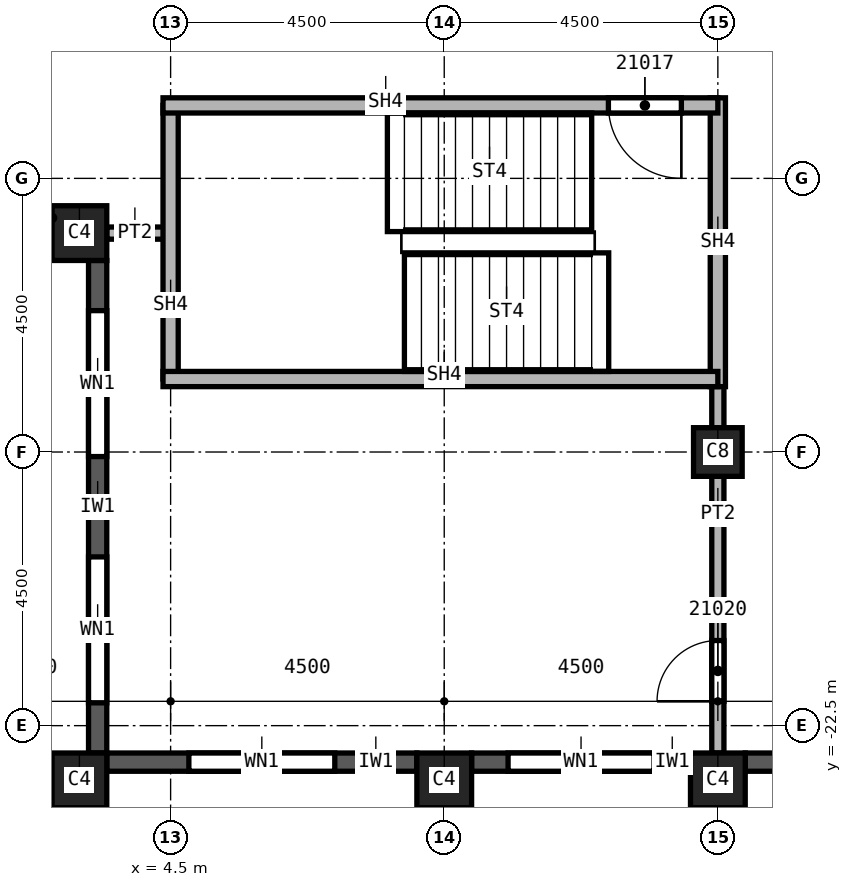
"""IFC4 building model, lengths in metres.
Left out: names, types, materials, properties, quantities, classifications, styles, units other than length and angle.
Written with IfcOpenShell. Run it as: python <this file> out.ifc"""

import sys

from ifc_helpers import new_model, si_unit, direction, frame, frame_2d, origin, origin_2d, place, context, subcontext, project, spatial, rectangle, extrude, element, fill, save


model = new_model("IFC4")
c1 = context("Model", 3, precision=1e-05, world=origin(), true_north=direction((0.0, 1.0)))
c2 = subcontext(c1, "Body", "Model", "MODEL_VIEW")
j1 = project(units=[si_unit("LENGTHUNIT", "METRE"), si_unit("PLANEANGLEUNIT", "RADIAN")], contexts=[c1])
p1 = place(None, origin())
s1 = spatial("IfcSite", under=j1, at=p1, CompositionType="ELEMENT")
p2 = place(p1, origin())
s2 = spatial("IfcBuilding", under=s1, at=p2, CompositionType="ELEMENT")
p3 = place(p2, frame((0.0, 0.0, 308.0)))
s3 = spatial("IfcBuildingStorey", under=s2, at=p3, CompositionType="ELEMENT", Elevation=308.0)
p4 = place(p3, frame((13.5, -18.0, 0.0), z_axis=(0.0, 0.0, 1.0), x_axis=(1.0, 0.0, 0.0)))
e1 = element("IfcColumn", 1, at=p4, inside=s3, PredefinedType="COLUMN", context=c2, shape_type="SweptSolid", body=[
    extrude(rectangle(XDim=0.8, YDim=0.8, at=origin_2d()), origin(), (0.0, 0.0, 1.0), 3.74),
])
for number, where, z_axis, x_axis in (
    (2, (3.0, -23.4, 0.0), (0.0, 0.0, 1.0), (1.0, 0.0, 0.0)),
    (3, (9.0, -23.4, 0.0), (0.0, 0.0, 1.0), (1.0, 0.0, 0.0)),
    (4, (13.5, -23.4, 0.0), (0.0, 0.0, 1.0), (1.0, 0.0, 0.0)),
    (5, (3.0, -14.4, 0.0), (0.0, 0.0, 1.0), (1.0, 0.0, 0.0)),
):
    element("IfcColumn", number, at=place(p3, frame(where, z_axis=z_axis, x_axis=x_axis)), inside=s3, PredefinedType="COLUMN", context=c2, shape_type="SweptSolid", body=[
        extrude(rectangle(XDim=0.9, YDim=0.9, at=origin_2d()), origin(), (0.0, 0.0, 1.0), 3.74),
    ])
p5 = place(p3, frame((3.3, -14.85, 0.0), z_axis=(0.0, 0.0, 1.0), x_axis=(0.0, -1.0, 0.0)))
e6 = element("IfcWall", 6, at=p5, inside=s3, PredefinedType="SOLIDWALL", context=c2, shape_type="SweptSolid", body=[
    extrude(rectangle(XDim=8.1, YDim=0.3, at=frame_2d((4.05, 0.0))), origin(), (0.0, 0.0, 1.0), 3.14),
])
p6 = place(p5, frame((0.825, 0.0, 0.8)))
e7 = element("IfcOpeningElement", 7, at=p6, cuts=e6, PredefinedType="OPENING", context=c2, shape_type="SweptSolid", body=[
    extrude(rectangle(XDim=2.4, YDim=1.95, at=frame_2d((1.2, 0.975))), frame((0.0, 0.15, 0.0), z_axis=(0.0, -1.0, 0.0), x_axis=(1.0, 0.0, 0.0)), (0.0, 0.0, 1.0), 0.3),
])
p7 = place(p5, frame((4.875, 0.0, 0.8)))
e8 = element("IfcOpeningElement", 8, at=p7, cuts=e6, PredefinedType="OPENING", context=c2, shape_type="SweptSolid", body=[
    extrude(rectangle(XDim=2.4, YDim=1.95, at=frame_2d((1.2, 0.975))), frame((0.0, 0.15, 0.0), z_axis=(0.0, -1.0, 0.0), x_axis=(1.0, 0.0, 0.0)), (0.0, 0.0, 1.0), 0.3),
])
p8 = place(p3, frame((3.45, -23.1, 0.0), z_axis=(0.0, 0.0, 1.0), x_axis=(1.0, 0.0, 0.0)))
e9 = element("IfcWall", 9, at=p8, inside=s3, PredefinedType="SOLIDWALL", context=c2, shape_type="SweptSolid", body=[
    extrude(rectangle(XDim=5.1, YDim=0.3, at=frame_2d((2.55, 0.0))), origin(), (0.0, 0.0, 1.0), 3.14),
])
p9 = place(p8, frame((1.35, 0.0, 0.8)))
e10 = element("IfcOpeningElement", 10, at=p9, cuts=e9, PredefinedType="OPENING", context=c2, shape_type="SweptSolid", body=[
    extrude(rectangle(XDim=2.4, YDim=1.95, at=frame_2d((1.2, 0.975))), frame((0.0, 0.15, 0.0), z_axis=(0.0, -1.0, 0.0), x_axis=(1.0, 0.0, 0.0)), (0.0, 0.0, 1.0), 0.3),
])
p10 = place(p3, frame((9.45, -23.1, 0.0), z_axis=(0.0, 0.0, 1.0), x_axis=(1.0, 0.0, 0.0)))
e11 = element("IfcWall", 11, at=p10, inside=s3, PredefinedType="SOLIDWALL", context=c2, shape_type="SweptSolid", body=[
    extrude(rectangle(XDim=3.6, YDim=0.3, at=frame_2d((1.8, 0.0))), origin(), (0.0, 0.0, 1.0), 3.14),
])
p11 = place(p10, frame((0.6, 0.0, 0.8)))
e12 = element("IfcOpeningElement", 12, at=p11, cuts=e11, PredefinedType="OPENING", context=c2, shape_type="SweptSolid", body=[
    extrude(rectangle(XDim=2.4, YDim=1.95, at=frame_2d((1.2, 0.975))), frame((0.0, 0.15, 0.0), z_axis=(0.0, -1.0, 0.0), x_axis=(1.0, 0.0, 0.0)), (0.0, 0.0, 1.0), 0.3),
])
p12 = place(p3, frame((13.95, -23.1, 0.0), z_axis=(0.0, 0.0, 1.0), x_axis=(1.0, 0.0, 0.0)))
e13 = element("IfcWall", 13, at=p12, inside=s3, PredefinedType="SOLIDWALL", context=c2, shape_type="SweptSolid", body=[
    extrude(rectangle(XDim=3.6, YDim=0.3, at=frame_2d((1.8, 0.0))), origin(), (0.0, 0.0, 1.0), 3.14),
])
p13 = place(p12, frame((0.625, 0.0, 0.8)))
e14 = element("IfcOpeningElement", 14, at=p13, cuts=e13, PredefinedType="OPENING", context=c2, shape_type="SweptSolid", body=[
    extrude(rectangle(XDim=0.6, YDim=1.95, at=frame_2d((0.3, 0.975))), frame((0.0, 0.15, 0.0), z_axis=(0.0, -1.0, 0.0), x_axis=(1.0, 0.0, 0.0)), (0.0, 0.0, 1.0), 0.3),
])
p14 = place(p12, frame((1.825, 0.0, 0.8)))
e15 = element("IfcOpeningElement", 15, at=p14, cuts=e13, PredefinedType="OPENING", context=c2, shape_type="SweptSolid", body=[
    extrude(rectangle(XDim=1.0, YDim=1.95, at=frame_2d((0.5, 0.975))), frame((0.0, 0.15, 0.0), z_axis=(0.0, -1.0, 0.0), x_axis=(1.0, 0.0, 0.0)), (0.0, 0.0, 1.0), 0.3),
])
p15 = place(p3, frame((4.5, -14.4, 0.0), z_axis=(0.0, 0.0, 1.0), x_axis=(-1.0, 0.0, 0.0)))
e16 = element("IfcWall", 16, at=p15, inside=s3, PredefinedType="PARTITIONING", context=c2, shape_type="SweptSolid", body=[
    extrude(rectangle(XDim=1.05, YDim=0.2, at=frame_2d((0.525, 0.0))), origin(), (0.0, 0.0, 1.0), 3.74),
])
p16 = place(p3, frame((13.5, -22.95, 0.0), z_axis=(0.0, 0.0, 1.0), x_axis=(0.0, 1.0, 0.0)))
e17 = element("IfcWall", 17, at=p16, inside=s3, PredefinedType="PARTITIONING", context=c2, shape_type="SweptSolid", body=[
    extrude(rectangle(XDim=6.275, YDim=0.2, at=frame_2d((3.137, 0.0))), origin(), (0.0, 0.0, 1.0), 3.74),
])
p17 = place(p16, frame((0.85, 0.0, 0.0)))
e18 = element("IfcOpeningElement", 18, at=p17, cuts=e17, PredefinedType="OPENING", context=c2, shape_type="SweptSolid", body=[
    extrude(rectangle(XDim=1.0, YDim=2.1, at=frame_2d((0.5, 1.05))), frame((0.0, 0.1, 0.0), z_axis=(0.0, -1.0, 0.0), x_axis=(1.0, 0.0, 0.0)), (0.0, 0.0, 1.0), 0.2),
])
p18 = place(p3, frame((4.5, -16.8, 0.0), z_axis=(0.0, 0.0, 1.0), x_axis=(0.0, 1.0, 0.0)))
e19 = element("IfcWall", 19, at=p18, inside=s3, PredefinedType="SOLIDWALL", context=c2, shape_type="SweptSolid", body=[
    extrude(rectangle(XDim=4.5, YDim=0.25, at=frame_2d((2.25, 0.0))), origin(), (0.0, 0.0, 1.0), 3.74),
])
p19 = place(p3, frame((13.5, -16.925, 0.0), z_axis=(0.0, 0.0, 1.0), x_axis=(0.0, 1.0, 0.0)))
e20 = element("IfcWall", 20, at=p19, inside=s3, PredefinedType="SOLIDWALL", context=c2, shape_type="SweptSolid", body=[
    extrude(rectangle(XDim=4.75, YDim=0.25, at=frame_2d((2.375, 0.0))), origin(), (0.0, 0.0, 1.0), 3.74),
])
p20 = place(p3, frame((13.5, -16.8, 0.0), z_axis=(0.0, 0.0, 1.0), x_axis=(-1.0, 0.0, 0.0)))
e21 = element("IfcWall", 21, at=p20, inside=s3, PredefinedType="SOLIDWALL", context=c2, shape_type="SweptSolid", body=[
    extrude(rectangle(XDim=9.125, YDim=0.25, at=frame_2d((4.562, 0.0))), origin(), (0.0, 0.0, 1.0), 3.74),
])
p21 = place(p3, frame((13.5, -12.3, 0.0), z_axis=(0.0, 0.0, 1.0), x_axis=(-1.0, 0.0, 0.0)))
e22 = element("IfcWall", 22, at=p21, inside=s3, PredefinedType="SOLIDWALL", context=c2, shape_type="SweptSolid", body=[
    extrude(rectangle(XDim=9.125, YDim=0.25, at=frame_2d((4.562, 0.0))), origin(), (0.0, 0.0, 1.0), 3.74),
])
p22 = place(p21, frame((0.6, 0.0, 0.0)))
e23 = element("IfcOpeningElement", 23, at=p22, cuts=e22, PredefinedType="OPENING", context=c2, shape_type="SweptSolid", body=[
    extrude(rectangle(XDim=1.2, YDim=2.1, at=frame_2d((0.6, 1.05))), frame((0.0, 0.125, 0.0), z_axis=(0.0, -1.0, 0.0), x_axis=(1.0, 0.0, 0.0)), (0.0, 0.0, 1.0), 0.25),
])
p23 = place(p6, origin())
e24 = element("IfcWindow", 24, at=p23, inside=s3, PartitioningType="SINGLE_PANEL", PredefinedType="WINDOW", context=c2, shape_type="SweptSolid", body=[
    extrude(rectangle(XDim=2.4, YDim=1.95, at=frame_2d((1.2, 0.975))), frame((0.0, 0.03, 0.0), z_axis=(0.0, -1.0, 0.0), x_axis=(1.0, 0.0, 0.0)), (0.0, 0.0, 1.0), 0.06),
])
fill(e7, e24)
p24 = place(p7, origin())
e25 = element("IfcWindow", 25, at=p24, inside=s3, PartitioningType="SINGLE_PANEL", PredefinedType="WINDOW", context=c2, shape_type="SweptSolid", body=[
    extrude(rectangle(XDim=2.4, YDim=1.95, at=frame_2d((1.2, 0.975))), frame((0.0, 0.03, 0.0), z_axis=(0.0, -1.0, 0.0), x_axis=(1.0, 0.0, 0.0)), (0.0, 0.0, 1.0), 0.06),
])
fill(e8, e25)
p25 = place(p9, origin())
e26 = element("IfcWindow", 26, at=p25, inside=s3, PartitioningType="SINGLE_PANEL", PredefinedType="WINDOW", context=c2, shape_type="SweptSolid", body=[
    extrude(rectangle(XDim=2.4, YDim=1.95, at=frame_2d((1.2, 0.975))), frame((0.0, 0.03, 0.0), z_axis=(0.0, -1.0, 0.0), x_axis=(1.0, 0.0, 0.0)), (0.0, 0.0, 1.0), 0.06),
])
fill(e10, e26)
p26 = place(p11, origin())
e27 = element("IfcWindow", 27, at=p26, inside=s3, PartitioningType="SINGLE_PANEL", PredefinedType="WINDOW", context=c2, shape_type="SweptSolid", body=[
    extrude(rectangle(XDim=2.4, YDim=1.95, at=frame_2d((1.2, 0.975))), frame((0.0, 0.03, 0.0), z_axis=(0.0, -1.0, 0.0), x_axis=(1.0, 0.0, 0.0)), (0.0, 0.0, 1.0), 0.06),
])
fill(e12, e27)
p27 = place(p22, origin())
e28 = element("IfcDoor", 28, at=p27, inside=s3, OperationType="SINGLE_SWING_RIGHT", PredefinedType="DOOR", context=c2, shape_type="SweptSolid", body=[
    extrude(rectangle(XDim=1.2, YDim=2.1, at=frame_2d((0.6, 1.05))), frame((0.0, 0.025, 0.0), z_axis=(0.0, -1.0, 0.0), x_axis=(1.0, 0.0, 0.0)), (0.0, 0.0, 1.0), 0.05),
])
fill(e23, e28)
p28 = place(p17, origin())
e29 = element("IfcDoor", 29, at=p28, inside=s3, OperationType="SINGLE_SWING_LEFT", PredefinedType="DOOR", context=c2, shape_type="SweptSolid", body=[
    extrude(rectangle(XDim=1.0, YDim=2.1, at=frame_2d((0.5, 1.05))), frame((0.0, 0.025, 0.0), z_axis=(0.0, -1.0, 0.0), x_axis=(1.0, 0.0, 0.0)), (0.0, 0.0, 1.0), 0.05),
])
fill(e18, e29)
save(model, sys.argv[1])
